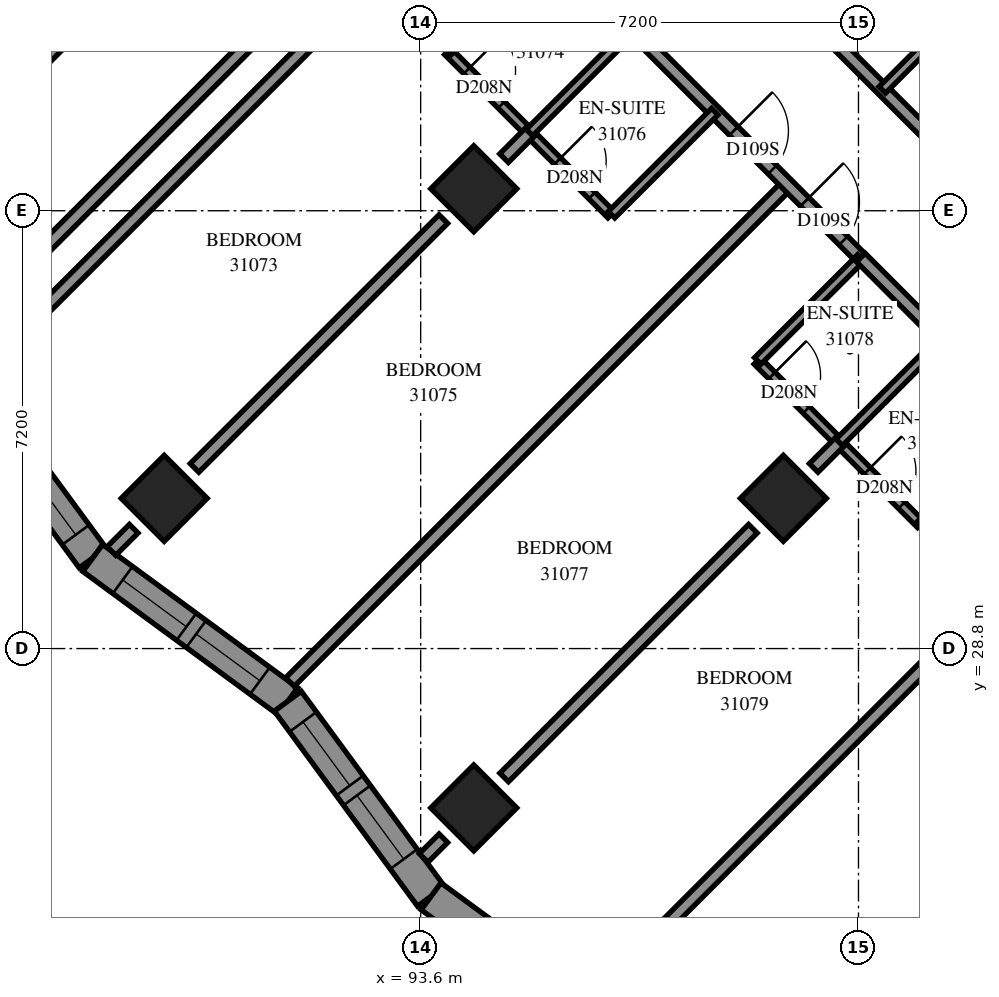
"""IFC4 building model, lengths in metres.
Left out: names, types, materials, properties, quantities, classifications, styles, units other than length and angle.
Written with IfcOpenShell. Run it as: python <this file> out.ifc"""

import sys

from ifc_helpers import new_model, si_unit, direction, frame, frame_2d, origin, origin_2d, place, context, subcontext, project, spatial, polyline, rectangle, outline, extrude, element, fill, save


model = new_model("IFC4")
c1 = context("Model", 3, precision=1e-05, world=origin(), true_north=direction((0.0, 1.0)))
c2 = subcontext(c1, "Body", "Model", "MODEL_VIEW")
j1 = project(units=[si_unit("LENGTHUNIT", "METRE"), si_unit("PLANEANGLEUNIT", "RADIAN")], contexts=[c1])
p1 = place(None, origin())
s1 = spatial("IfcSite", under=j1, at=p1, CompositionType="ELEMENT")
p2 = place(p1, origin())
s2 = spatial("IfcBuilding", under=s1, at=p2, CompositionType="ELEMENT")
p3 = place(p2, frame((0.0, 0.0, 115.2)))
s3 = spatial("IfcBuildingStorey", under=s2, at=p3, CompositionType="ELEMENT", Elevation=115.2)
for number, where, z_axis, x_axis in (
    (1, (94.474, 36.362, 0.0), (0.0, 0.0, 1.0), (0.707, -0.707, 0.0)),
    (2, (89.382, 31.271, 0.0), (0.0, 0.0, 1.0), (0.707, -0.707, 0.0)),
    (3, (99.565, 31.271, 0.0), (0.0, 0.0, 1.0), (0.707, -0.707, 0.0)),
    (4, (94.474, 26.18, 0.0), (0.0, 0.0, 1.0), (0.707, -0.707, 0.0)),
):
    element("IfcColumn", number, at=place(p3, frame(where, z_axis=z_axis, x_axis=x_axis)), inside=s3, PredefinedType="COLUMN", context=c2, shape_type="SweptSolid", body=[
        extrude(rectangle(XDim=1.0, YDim=1.0, at=origin_2d()), origin(), (0.0, 0.0, 1.0), 3.1),
    ])
p4 = place(p3, frame((87.12, 38.625, -0.3), z_axis=(0.0, 0.0, 1.0), x_axis=(0.7071067812, 0.7071067812, 0.0)))
e5 = element("IfcWall", 5, at=p4, inside=s3, PredefinedType="SHEAR", context=c2, shape_type="SweptSolid", body=[
    extrude(rectangle(XDim=14.4, YDim=0.8, at=frame_2d((7.2, 0.0))), origin(), (0.0, 0.0, 1.0), 2.7),
])
p5 = place(p4, frame((4.55, 0.0, 0.3)))
e6 = element("IfcOpeningElement", 6, at=p5, cuts=e5, PredefinedType="OPENING", context=c2, shape_type="SweptSolid", body=[
    extrude(rectangle(XDim=1.1, YDim=2.1, at=frame_2d((0.55, 1.05))), frame((0.0, 0.41, 0.0), z_axis=(0.0, -1.0, 0.0), x_axis=(1.0, 0.0, 0.0)), (0.0, 0.0, 1.0), 0.82),
])
p6 = place(p4, frame((11.35, 0.0, 0.3)))
e7 = element("IfcOpeningElement", 7, at=p6, cuts=e5, PredefinedType="OPENING", context=c2, shape_type="SweptSolid", body=[
    extrude(rectangle(XDim=1.1, YDim=2.1, at=frame_2d((0.55, 1.05))), frame((0.0, 0.41, 0.0), z_axis=(0.0, -1.0, 0.0), x_axis=(1.0, 0.0, 0.0)), (0.0, 0.0, 1.0), 0.82),
])
p7 = place(p3, frame((85.851, 33.498, 0.0), z_axis=(0.0, 0.0, 1.0), x_axis=(0.5918329943, -0.8060606099, 0.0)))
e8 = element("IfcWall", 8, at=p7, inside=s3, PredefinedType="SOLIDWALL", context=c2, shape_type="SweptSolid", body=[
    extrude(outline(polyline([(0.042, -0.275), (4.022, -0.275), (3.938, 0.275), (-0.042, 0.275), (0.042, -0.275)])), origin(), (0.0, 0.0, 1.0), 3.1),
])
p8 = place(p7, frame((0.708, 0.0, 0.5)))
e9 = element("IfcOpeningElement", 9, at=p8, cuts=e8, PredefinedType="OPENING", context=c2, shape_type="SweptSolid", body=[
    extrude(rectangle(XDim=1.3, YDim=2.45, at=frame_2d((0.65, 1.225))), frame((0.0, 0.285, 0.0), z_axis=(0.0, -1.0, 0.0), x_axis=(1.0, 0.0, 0.0)), (0.0, 0.0, 1.0), 0.57),
])
p9 = place(p7, frame((2.208, 0.0, 0.5)))
e10 = element("IfcOpeningElement", 10, at=p9, cuts=e8, PredefinedType="OPENING", context=c2, shape_type="SweptSolid", body=[
    extrude(rectangle(XDim=1.3, YDim=2.45, at=frame_2d((0.65, 1.225))), frame((0.0, 0.285, 0.0), z_axis=(0.0, -1.0, 0.0), x_axis=(1.0, 0.0, 0.0)), (0.0, 0.0, 1.0), 0.57),
])
p10 = place(p3, frame((88.207, 30.29, 0.0), z_axis=(0.0, 0.0, 1.0), x_axis=(0.8060813944, -0.5918046853, 0.0)))
e11 = element("IfcWall", 11, at=p10, inside=s3, PredefinedType="SOLIDWALL", context=c2, shape_type="SweptSolid", body=[
    extrude(outline(polyline([(-0.042, -0.275), (3.938, -0.275), (4.022, 0.275), (0.042, 0.275), (-0.042, -0.275)])), origin(), (0.0, 0.0, 1.0), 3.1),
])
p11 = place(p10, frame((0.611, 0.0, 0.5)))
e12 = element("IfcOpeningElement", 12, at=p11, cuts=e11, PredefinedType="OPENING", context=c2, shape_type="SweptSolid", body=[
    extrude(rectangle(XDim=1.3, YDim=2.45, at=frame_2d((0.65, 1.225))), frame((0.0, 0.285, 0.0), z_axis=(0.0, -1.0, 0.0), x_axis=(1.0, 0.0, 0.0)), (0.0, 0.0, 1.0), 0.57),
])
p12 = place(p10, frame((2.111, 0.0, 0.5)))
e13 = element("IfcOpeningElement", 13, at=p12, cuts=e11, PredefinedType="OPENING", context=c2, shape_type="SweptSolid", body=[
    extrude(rectangle(XDim=1.3, YDim=2.45, at=frame_2d((0.65, 1.225))), frame((0.0, 0.285, 0.0), z_axis=(0.0, -1.0, 0.0), x_axis=(1.0, 0.0, 0.0)), (0.0, 0.0, 1.0), 0.57),
])
p13 = place(p3, frame((91.415, 27.934, 0.0), z_axis=(0.0, 0.0, 1.0), x_axis=(0.5918046853, -0.8060813944, 0.0)))
e14 = element("IfcWall", 14, at=p13, inside=s3, PredefinedType="SOLIDWALL", context=c2, shape_type="SweptSolid", body=[
    extrude(outline(polyline([(0.042, -0.275), (4.022, -0.275), (3.938, 0.275), (-0.042, 0.275), (0.042, -0.275)])), origin(), (0.0, 0.0, 1.0), 3.1),
])
p14 = place(p13, frame((0.421, 0.0, 0.5)))
e15 = element("IfcOpeningElement", 15, at=p14, cuts=e14, PredefinedType="OPENING", context=c2, shape_type="SweptSolid", body=[
    extrude(rectangle(XDim=1.3, YDim=2.45, at=frame_2d((0.65, 1.225))), frame((0.0, 0.285, 0.0), z_axis=(0.0, -1.0, 0.0), x_axis=(1.0, 0.0, 0.0)), (0.0, 0.0, 1.0), 0.57),
])
p15 = place(p13, frame((1.921, 0.0, 0.5)))
e16 = element("IfcOpeningElement", 16, at=p15, cuts=e14, PredefinedType="OPENING", context=c2, shape_type="SweptSolid", body=[
    extrude(rectangle(XDim=1.3, YDim=2.45, at=frame_2d((0.65, 1.225))), frame((0.0, 0.285, 0.0), z_axis=(0.0, -1.0, 0.0), x_axis=(1.0, 0.0, 0.0)), (0.0, 0.0, 1.0), 0.57),
])
p16 = place(p3, frame((93.771, 24.726, 0.0), z_axis=(0.0, 0.0, 1.0), x_axis=(0.8060798805, -0.5918067474, 0.0)))
e17 = element("IfcWall", 17, at=p16, inside=s3, PredefinedType="SOLIDWALL", context=c2, shape_type="SweptSolid", body=[
    extrude(outline(polyline([(-0.042, -0.275), (3.938, -0.275), (4.064, 0.275), (0.042, 0.275), (-0.042, -0.275)])), origin(), (0.0, 0.0, 1.0), 3.1),
])
p17 = place(p16, frame((1.073, 0.0, 0.5)))
e18 = element("IfcOpeningElement", 18, at=p17, cuts=e17, PredefinedType="OPENING", context=c2, shape_type="SweptSolid", body=[
    extrude(rectangle(XDim=1.2, YDim=2.45, at=frame_2d((0.6, 1.225))), frame((0.0, 0.285, 0.0), z_axis=(0.0, -1.0, 0.0), x_axis=(1.0, 0.0, 0.0)), (0.0, 0.0, 1.0), 0.57),
])
p18 = place(p3, frame((96.469, 23.086, 0.0), z_axis=(0.0, 0.0, 1.0), x_axis=(0.7071067812, 0.7071067812, 0.0)))
e19 = element("IfcWall", 19, at=p18, inside=s3, PredefinedType="PARTITIONING", context=c2, shape_type="SweptSolid", body=[
    extrude(rectangle(XDim=11.677, YDim=0.2, at=frame_2d((5.838, 0.0))), origin(), (0.0, 0.0, 1.0), 3.1),
])
p19 = place(p3, frame((86.33, 33.311, 0.0), z_axis=(0.0, 0.0, 1.0), x_axis=(0.7071067812, 0.7071067812, 0.0)))
e20 = element("IfcWall", 20, at=p19, inside=s3, PredefinedType="PARTITIONING", context=c2, shape_type="SweptSolid", body=[
    extrude(rectangle(XDim=11.616, YDim=0.2, at=frame_2d((5.808, 0.0))), origin(), (0.0, 0.0, 1.0), 3.1),
])
p20 = place(p3, frame((91.451, 28.249, 0.0), z_axis=(0.0, 0.0, 1.0), x_axis=(0.7071067812, 0.7071067812, 0.0)))
e21 = element("IfcWall", 21, at=p20, inside=s3, PredefinedType="PARTITIONING", context=c2, shape_type="SweptSolid", body=[
    extrude(rectangle(XDim=11.574, YDim=0.2, at=frame_2d((5.787, 0.0))), origin(), (0.0, 0.0, 1.0), 3.1),
])
p21 = place(p3, frame((86.835, 34.806, 0.0), z_axis=(0.0, 0.0, 1.0), x_axis=(0.7071067812, 0.7071067812, 0.0)))
e22 = element("IfcWall", 22, at=p21, inside=s3, PredefinedType="PARTITIONING", context=c2, shape_type="SweptSolid", body=[
    extrude(rectangle(XDim=10.201, YDim=0.2, at=frame_2d((5.1, 0.0))), origin(), (0.0, 0.0, 1.0), 3.1),
])
p22 = place(p21, frame((8.959, 0.0, 0.0)))
e23 = element("IfcOpeningElement", 23, at=p22, cuts=e22, PredefinedType="OPENING", context=c2, shape_type="SweptSolid", body=[
    extrude(rectangle(XDim=1.0, YDim=2.1, at=frame_2d((0.5, 1.05))), frame((0.0, 0.11, 0.0), z_axis=(0.0, -1.0, 0.0), x_axis=(1.0, 0.0, 0.0)), (0.0, 0.0, 1.0), 0.22),
])
p23 = place(p3, frame((94.047, 42.015, 0.0), z_axis=(0.0, 0.0, 1.0), x_axis=(0.7071067812, -0.7071067812, 0.0)))
e24 = element("IfcWall", 24, at=p23, inside=s3, PredefinedType="PARTITIONING", context=c2, shape_type="SweptSolid", body=[
    extrude(rectangle(XDim=9.6, YDim=0.2, at=frame_2d((4.8, 0.0))), origin(), (0.0, 0.0, 1.0), 3.1),
])
p24 = place(p23, frame((1.099, 0.0, 0.0)))
e25 = element("IfcOpeningElement", 25, at=p24, cuts=e24, PredefinedType="OPENING", context=c2, shape_type="SweptSolid", body=[
    extrude(rectangle(XDim=0.9, YDim=2.1, at=frame_2d((0.45, 1.05))), frame((0.0, 0.11, 0.0), z_axis=(0.0, -1.0, 0.0), x_axis=(1.0, 0.0, 0.0)), (0.0, 0.0, 1.0), 0.22),
])
p25 = place(p23, frame((6.649, 0.0, 0.0)))
e26 = element("IfcOpeningElement", 26, at=p25, cuts=e24, PredefinedType="OPENING", context=c2, shape_type="SweptSolid", body=[
    extrude(rectangle(XDim=0.9, YDim=2.1, at=frame_2d((0.45, 1.05))), frame((0.0, 0.11, 0.0), z_axis=(0.0, -1.0, 0.0), x_axis=(1.0, 0.0, 0.0)), (0.0, 0.0, 1.0), 0.22),
])
p26 = place(p23, frame((8.3, 0.0, 0.0)))
e27 = element("IfcOpeningElement", 27, at=p26, cuts=e24, PredefinedType="OPENING", context=c2, shape_type="SweptSolid", body=[
    extrude(rectangle(XDim=0.9, YDim=2.1, at=frame_2d((0.45, 1.05))), frame((0.0, 0.11, 0.0), z_axis=(0.0, -1.0, 0.0), x_axis=(1.0, 0.0, 0.0)), (0.0, 0.0, 1.0), 0.22),
])
p27 = place(p3, frame((96.103, 43.083, 0.0), z_axis=(0.0, 0.0, 1.0), x_axis=(0.7071067812, -0.7071067812, 0.0)))
e28 = element("IfcWall", 28, at=p27, inside=s3, PredefinedType="PARTITIONING", context=c2, shape_type="SweptSolid", body=[
    extrude(rectangle(XDim=8.491, YDim=0.2, at=frame_2d((4.245, 0.0))), origin(), (0.0, 0.0, 1.0), 3.1),
])
p28 = place(p27, frame((1.995, 0.0, 0.0)))
e29 = element("IfcOpeningElement", 29, at=p28, cuts=e28, PredefinedType="OPENING", context=c2, shape_type="SweptSolid", body=[
    extrude(rectangle(XDim=0.9, YDim=2.1, at=frame_2d((0.45, 1.05))), frame((0.0, 0.11, 0.0), z_axis=(0.0, -1.0, 0.0), x_axis=(1.0, 0.0, 0.0)), (0.0, 0.0, 1.0), 0.22),
])
p29 = place(p27, frame((4.27, 0.0, 0.0)))
e30 = element("IfcOpeningElement", 30, at=p29, cuts=e28, PredefinedType="OPENING", context=c2, shape_type="SweptSolid", body=[
    extrude(rectangle(XDim=0.9, YDim=2.1, at=frame_2d((0.45, 1.05))), frame((0.0, 0.11, 0.0), z_axis=(0.0, -1.0, 0.0), x_axis=(1.0, 0.0, 0.0)), (0.0, 0.0, 1.0), 0.22),
])
p30 = place(p3, frame((89.881, 31.771, 0.0), z_axis=(0.0, 0.0, 1.0), x_axis=(0.7071067812, 0.7071067812, 0.0)))
e31 = element("IfcWall", 31, at=p30, inside=s3, PredefinedType="PARTITIONING", context=c2, shape_type="SweptSolid", body=[
    extrude(rectangle(XDim=5.787, YDim=0.2, at=frame_2d((2.893, 0.0))), origin(), (0.0, 0.0, 1.0), 3.1),
])
p31 = place(p3, frame((100.063, 21.589, 0.0), z_axis=(0.0, 0.0, 1.0), x_axis=(0.7071067812, 0.7071067812, 0.0)))
e32 = element("IfcWall", 32, at=p31, inside=s3, PredefinedType="PARTITIONING", context=c2, shape_type="SweptSolid", body=[
    extrude(rectangle(XDim=5.787, YDim=0.2, at=frame_2d((2.893, 0.0))), origin(), (0.0, 0.0, 1.0), 2.6),
])
p32 = place(p3, frame((94.973, 26.681, 0.0), z_axis=(0.0, 0.0, 1.0), x_axis=(0.7071067812, 0.7071067812, 0.0)))
e33 = element("IfcWall", 33, at=p32, inside=s3, PredefinedType="PARTITIONING", context=c2, shape_type="SweptSolid", body=[
    extrude(rectangle(XDim=5.784, YDim=0.2, at=frame_2d((2.892, 0.0))), origin(), (0.0, 0.0, 1.0), 3.1),
])
p33 = place(p3, frame((99.137, 33.531, 0.0), z_axis=(0.0, 0.0, 1.0), x_axis=(0.7071067812, -0.7071067812, 0.0)))
e34 = element("IfcWall", 34, at=p33, inside=s3, PredefinedType="PARTITIONING", context=c2, shape_type="SweptSolid", body=[
    extrude(rectangle(XDim=3.801, YDim=0.15, at=frame_2d((1.901, 0.0))), origin(), (0.0, 0.0, 1.0), 3.1),
])
p34 = place(p33, frame((0.339, 0.0, 0.0)))
e35 = element("IfcOpeningElement", 35, at=p34, cuts=e34, PredefinedType="OPENING", context=c2, shape_type="SweptSolid", body=[
    extrude(rectangle(XDim=0.8, YDim=2.1, at=frame_2d((0.4, 1.05))), frame((0.0, 0.085, 0.0), z_axis=(0.0, -1.0, 0.0), x_axis=(1.0, 0.0, 0.0)), (0.0, 0.0, 1.0), 0.17),
])
p35 = place(p33, frame((2.557, 0.0, 0.0)))
e36 = element("IfcOpeningElement", 36, at=p35, cuts=e34, PredefinedType="OPENING", context=c2, shape_type="SweptSolid", body=[
    extrude(rectangle(XDim=0.8, YDim=2.1, at=frame_2d((0.4, 1.05))), frame((0.0, 0.085, 0.0), z_axis=(0.0, -1.0, 0.0), x_axis=(1.0, 0.0, 0.0)), (0.0, 0.0, 1.0), 0.17),
])
p36 = place(p3, frame((94.047, 38.621, 0.0), z_axis=(0.0, 0.0, 1.0), x_axis=(0.7071067812, -0.7071067812, 0.0)))
e37 = element("IfcWall", 37, at=p36, inside=s3, PredefinedType="PARTITIONING", context=c2, shape_type="SweptSolid", body=[
    extrude(rectangle(XDim=3.799, YDim=0.15, at=frame_2d((1.899, 0.0))), origin(), (0.0, 0.0, 1.0), 3.1),
])
p37 = place(p36, frame((0.444, 0.0, 0.0)))
e38 = element("IfcOpeningElement", 38, at=p37, cuts=e37, PredefinedType="OPENING", context=c2, shape_type="SweptSolid", body=[
    extrude(rectangle(XDim=0.8, YDim=2.1, at=frame_2d((0.4, 1.05))), frame((0.0, 0.085, 0.0), z_axis=(0.0, -1.0, 0.0), x_axis=(1.0, 0.0, 0.0)), (0.0, 0.0, 1.0), 0.17),
])
p38 = place(p36, frame((2.551, 0.0, 0.0)))
e39 = element("IfcOpeningElement", 39, at=p38, cuts=e37, PredefinedType="OPENING", context=c2, shape_type="SweptSolid", body=[
    extrude(rectangle(XDim=0.8, YDim=2.1, at=frame_2d((0.4, 1.05))), frame((0.0, 0.085, 0.0), z_axis=(0.0, -1.0, 0.0), x_axis=(1.0, 0.0, 0.0)), (0.0, 0.0, 1.0), 0.17),
])
for number, where, z_axis, x_axis in (
    (40, (101.192, 37.988, 0.0), (0.0, 0.0, 1.0), (0.707, 0.708, 0.0)),
    (41, (95.389, 37.285, 0.0), (0.0, 0.0, 1.0), (0.708, 0.707, 0.0)),
    (42, (94.052, 38.622, 0.0), (0.0, 0.0, 1.0), (0.707, 0.708, 0.0)),
    (43, (96.739, 35.935, 0.0), (0.0, 0.0, 1.0), (0.708, 0.707, 0.0)),
    (44, (99.143, 33.531, 0.0), (0.0, 0.0, 1.0), (0.708, 0.707, 0.0)),
    (45, (101.83, 30.844, 0.0), (0.0, 0.0, 1.0), (0.707, 0.708, 0.0)),
):
    element("IfcWall", number, at=place(p3, frame(where, z_axis=z_axis, x_axis=x_axis)), inside=s3, PredefinedType="PARTITIONING", context=c2, shape_type="SweptSolid", body=[
        extrude(rectangle(XDim=2.4, YDim=0.15, at=frame_2d((1.2, 0.0))), origin(), (0.0, 0.0, 1.0), 3.1),
    ])
p39 = place(p3, frame((100.483, 32.191, 0.0), z_axis=(0.0, 0.0, 1.0), x_axis=(0.7071067812, 0.7071067812, 0.0)))
e46 = element("IfcWall", 46, at=p39, inside=s3, PredefinedType="PARTITIONING", context=c2, shape_type="SweptSolid", body=[
    extrude(rectangle(XDim=2.398, YDim=0.15, at=frame_2d((1.199, 0.0))), origin(), (0.0, 0.0, 1.0), 3.1),
])
p40 = place(p3, frame((100.839, 35.231, 0.0), z_axis=(0.0, 0.0, 1.0), x_axis=(0.7065800724, -0.7076330979, 0.0)))
e47 = element("IfcWall", 47, at=p40, inside=s3, PredefinedType="PARTITIONING", context=c2, shape_type="SweptSolid", body=[
    extrude(rectangle(XDim=1.899, YDim=0.2, at=frame_2d((0.95, 0.0))), origin(), (0.0, 0.0, 1.0), 3.1),
])
p41 = place(p3, frame((100.063, 31.771, 0.0), z_axis=(0.0, 0.0, 1.0), x_axis=(0.7071067812, 0.7071067812, 0.0)))
e48 = element("IfcWall", 48, at=p41, inside=s3, PredefinedType="PARTITIONING", context=c2, shape_type="SweptSolid", body=[
    extrude(rectangle(XDim=0.594, YDim=0.2, at=frame_2d((0.297, 0.0))), origin(), (0.0, 0.0, 1.0), 3.1),
])
p42 = place(p3, frame((94.971, 36.865, 0.0), z_axis=(0.0, 0.0, 1.0), x_axis=(0.7054171665, 0.7087923682, 0.0)))
e49 = element("IfcWall", 49, at=p42, inside=s3, PredefinedType="PARTITIONING", context=c2, shape_type="SweptSolid", body=[
    extrude(rectangle(XDim=0.593, YDim=0.2, at=frame_2d((0.296, 0.0))), origin(), (0.0, 0.0, 1.0), 3.1),
])
p43 = place(p3, frame((88.515, 30.405, 0.0), z_axis=(0.0, 0.0, 1.0), x_axis=(0.7070102149, 0.7072033343, 0.0)))
e50 = element("IfcWall", 50, at=p43, inside=s3, PredefinedType="PARTITIONING", context=c2, shape_type="SweptSolid", body=[
    extrude(rectangle(XDim=0.518, YDim=0.2, at=frame_2d((0.259, 0.0))), origin(), (0.0, 0.0, 1.0), 3.1),
])
p44 = place(p3, frame((93.649, 25.357, 0.0), z_axis=(0.0, 0.0, 1.0), x_axis=(0.7072158101, 0.7069977355, 0.0)))
e51 = element("IfcWall", 51, at=p44, inside=s3, PredefinedType="PARTITIONING", context=c2, shape_type="SweptSolid", body=[
    extrude(rectangle(XDim=0.459, YDim=0.2, at=frame_2d((0.229, 0.0))), origin(), (0.0, 0.0, 1.0), 3.1),
])
p45 = place(p9, origin())
e52 = element("IfcWindow", 52, at=p45, inside=s3, PartitioningType="SINGLE_PANEL", PredefinedType="WINDOW", context=c2, shape_type="SweptSolid", body=[
    extrude(rectangle(XDim=1.3, YDim=2.45, at=frame_2d((0.65, 1.225))), frame((0.0, 0.155, 0.0), z_axis=(0.0, -1.0, 0.0), x_axis=(1.0, 0.0, 0.0)), (0.0, 0.0, 1.0), 0.06),
])
fill(e10, e52)
p46 = place(p11, origin())
e53 = element("IfcWindow", 53, at=p46, inside=s3, PartitioningType="SINGLE_PANEL", PredefinedType="WINDOW", context=c2, shape_type="SweptSolid", body=[
    extrude(rectangle(XDim=1.3, YDim=2.45, at=frame_2d((0.65, 1.225))), frame((0.0, 0.155, 0.0), z_axis=(0.0, -1.0, 0.0), x_axis=(1.0, 0.0, 0.0)), (0.0, 0.0, 1.0), 0.06),
])
fill(e12, e53)
p47 = place(p12, origin())
e54 = element("IfcWindow", 54, at=p47, inside=s3, PartitioningType="SINGLE_PANEL", PredefinedType="WINDOW", context=c2, shape_type="SweptSolid", body=[
    extrude(rectangle(XDim=1.3, YDim=2.45, at=frame_2d((0.65, 1.225))), frame((0.0, 0.155, 0.0), z_axis=(0.0, -1.0, 0.0), x_axis=(1.0, 0.0, 0.0)), (0.0, 0.0, 1.0), 0.06),
])
fill(e13, e54)
p48 = place(p14, origin())
e55 = element("IfcWindow", 55, at=p48, inside=s3, PartitioningType="SINGLE_PANEL", PredefinedType="WINDOW", context=c2, shape_type="SweptSolid", body=[
    extrude(rectangle(XDim=1.3, YDim=2.45, at=frame_2d((0.65, 1.225))), frame((0.0, 0.155, 0.0), z_axis=(0.0, -1.0, 0.0), x_axis=(1.0, 0.0, 0.0)), (0.0, 0.0, 1.0), 0.06),
])
fill(e15, e55)
p49 = place(p15, origin())
e56 = element("IfcWindow", 56, at=p49, inside=s3, PartitioningType="SINGLE_PANEL", PredefinedType="WINDOW", context=c2, shape_type="SweptSolid", body=[
    extrude(rectangle(XDim=1.3, YDim=2.45, at=frame_2d((0.65, 1.225))), frame((0.0, 0.155, 0.0), z_axis=(0.0, -1.0, 0.0), x_axis=(1.0, 0.0, 0.0)), (0.0, 0.0, 1.0), 0.06),
])
fill(e16, e56)
p50 = place(p37, origin())
e57 = element("IfcDoor", 57, at=p50, inside=s3, OperationType="SINGLE_SWING_RIGHT", PredefinedType="DOOR", context=c2, shape_type="SweptSolid", body=[
    extrude(rectangle(XDim=0.8, YDim=2.1, at=frame_2d((0.4, 1.05))), frame((0.0, 0.025, 0.0), z_axis=(0.0, -1.0, 0.0), x_axis=(1.0, 0.0, 0.0)), (0.0, 0.0, 1.0), 0.05),
])
fill(e38, e57)
p51 = place(p25, origin())
e58 = element("IfcDoor", 58, at=p51, inside=s3, OperationType="SINGLE_SWING_RIGHT", PredefinedType="DOOR", context=c2, shape_type="SweptSolid", body=[
    extrude(rectangle(XDim=0.9, YDim=2.1, at=frame_2d((0.45, 1.05))), frame((0.0, 0.025, 0.0), z_axis=(0.0, -1.0, 0.0), x_axis=(1.0, 0.0, 0.0)), (0.0, 0.0, 1.0), 0.05),
])
fill(e26, e58)
p52 = place(p38, origin())
e59 = element("IfcDoor", 59, at=p52, inside=s3, OperationType="SINGLE_SWING_RIGHT", PredefinedType="DOOR", context=c2, shape_type="SweptSolid", body=[
    extrude(rectangle(XDim=0.8, YDim=2.1, at=frame_2d((0.4, 1.05))), frame((0.0, 0.025, 0.0), z_axis=(0.0, -1.0, 0.0), x_axis=(1.0, 0.0, 0.0)), (0.0, 0.0, 1.0), 0.05),
])
fill(e39, e59)
p53 = place(p26, origin())
e60 = element("IfcDoor", 60, at=p53, inside=s3, OperationType="SINGLE_SWING_LEFT", PredefinedType="DOOR", context=c2, shape_type="SweptSolid", body=[
    extrude(rectangle(XDim=0.9, YDim=2.1, at=frame_2d((0.45, 1.05))), frame((0.0, 0.025, 0.0), z_axis=(0.0, -1.0, 0.0), x_axis=(1.0, 0.0, 0.0)), (0.0, 0.0, 1.0), 0.05),
])
fill(e27, e60)
p54 = place(p34, origin())
e61 = element("IfcDoor", 61, at=p54, inside=s3, OperationType="SINGLE_SWING_RIGHT", PredefinedType="DOOR", context=c2, shape_type="SweptSolid", body=[
    extrude(rectangle(XDim=0.8, YDim=2.1, at=frame_2d((0.4, 1.05))), frame((0.0, 0.025, 0.0), z_axis=(0.0, -1.0, 0.0), x_axis=(1.0, 0.0, 0.0)), (0.0, 0.0, 1.0), 0.05),
])
fill(e35, e61)
p55 = place(p35, origin())
e62 = element("IfcDoor", 62, at=p55, inside=s3, OperationType="SINGLE_SWING_RIGHT", PredefinedType="DOOR", context=c2, shape_type="SweptSolid", body=[
    extrude(rectangle(XDim=0.8, YDim=2.1, at=frame_2d((0.4, 1.05))), frame((0.0, 0.025, 0.0), z_axis=(0.0, -1.0, 0.0), x_axis=(1.0, 0.0, 0.0)), (0.0, 0.0, 1.0), 0.05),
])
fill(e36, e62)
save(model, sys.argv[1])
